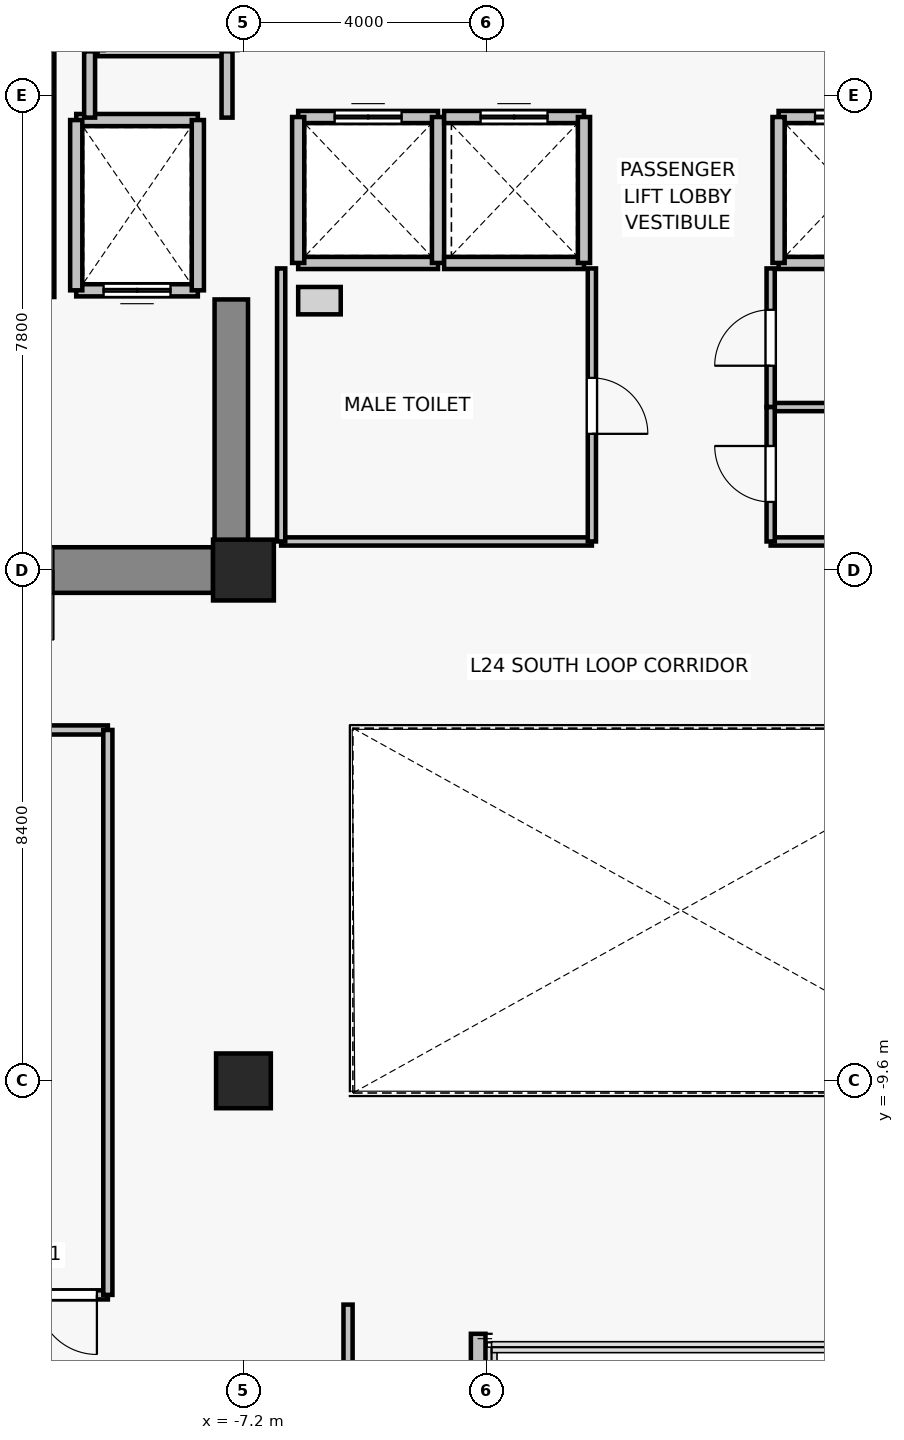
"""IFC4 building model, lengths in metres.
Left out: names, types, materials, properties, quantities, classifications, styles, units other than length and angle.
Written with IfcOpenShell. Run it as: python <this file> out.ifc"""

import sys

from ifc_helpers import new_model, si_unit, direction, frame, frame_2d, origin, origin_2d, place, context, subcontext, project, spatial, rectangle, extrude, source, transform, mapped, element, fill, save


model = new_model("IFC4")
c1 = context("Model", 3, precision=1e-05, world=origin(), true_north=direction((0.0, 1.0)))
c2 = subcontext(c1, "Body", "Model", "MODEL_VIEW")
j1 = project(units=[si_unit("LENGTHUNIT", "METRE"), si_unit("PLANEANGLEUNIT", "RADIAN")], contexts=[c1])
p1 = place(None, origin())
s1 = spatial("IfcSite", under=j1, at=p1, CompositionType="ELEMENT")
p2 = place(p1, origin())
s2 = spatial("IfcBuilding", under=s1, at=p2, CompositionType="ELEMENT")
p3 = place(p2, frame((0.0, 0.0, 90.1)))
s3 = spatial("IfcBuildingStorey", under=s2, at=p3, CompositionType="ELEMENT", Elevation=90.1)
p4 = place(p3, frame((-7.2, -1.2, 0.0), z_axis=(0.0, 0.0, 1.0), x_axis=(1.0, 0.0, 0.0)))
e1 = element("IfcColumn", 1, at=p4, inside=s3, PredefinedType="COLUMN", context=c2, shape_type="SweptSolid", body=[
    extrude(rectangle(XDim=1.0, YDim=1.0, at=origin_2d()), origin(), (0.0, 0.0, 1.0), 3.3),
])
p5 = place(p3, frame((-7.2, -9.6, 0.0), z_axis=(0.0, 0.0, 1.0), x_axis=(1.0, 0.0, 0.0)))
e2 = element("IfcColumn", 2, at=p5, inside=s3, PredefinedType="COLUMN", context=c2, shape_type="SweptSolid", body=[
    extrude(rectangle(XDim=0.9, YDim=0.9, at=origin_2d()), origin(), (0.0, 0.0, 1.0), 3.3),
])
p6 = place(p3, frame((-7.7, -1.2, 0.0), z_axis=(0.0, 0.0, 1.0), x_axis=(-1.0, 0.0, 0.0)))
e3 = element("IfcWall", 3, at=p6, inside=s3, PredefinedType="SHEAR", context=c2, shape_type="SweptSolid", body=[
    extrude(rectangle(XDim=6.2, YDim=0.75, at=frame_2d((3.1, 0.0))), origin(), (0.0, 0.0, 1.0), 3.075),
])
p7 = place(p6, frame((2.625, 0.0, 0.0)))
e4 = element("IfcOpeningElement", 4, at=p7, cuts=e3, PredefinedType="OPENING", context=c2, shape_type="SweptSolid", body=[
    extrude(rectangle(XDim=1.15, YDim=2.15, at=frame_2d((0.575, 1.075))), frame((0.0, 0.385, 0.0), z_axis=(0.0, -1.0, 0.0), x_axis=(1.0, 0.0, 0.0)), (0.0, 0.0, 1.0), 0.77),
])
p8 = place(p3, frame((-7.4, -0.825, 0.0), z_axis=(0.0, 0.0, 1.0), x_axis=(0.0, 1.0, 0.0)))
e5 = element("IfcWall", 5, at=p8, inside=s3, PredefinedType="SHEAR", context=c2, shape_type="SweptSolid", body=[
    extrude(rectangle(XDim=4.075, YDim=0.55, at=frame_2d((2.038, 0.0))), origin(), (0.0, 0.0, 1.0), 3.075),
])
p9 = place(p3, frame((-3.34, -17.56, 0.0), z_axis=(0.0, 0.0, 1.0), x_axis=(0.0, 1.0, 0.0)))
e6 = element("IfcWall", 6, at=p9, inside=s3, PredefinedType="SOLIDWALL", context=c2, shape_type="SweptSolid", body=[
    extrude(rectangle(XDim=3.8, YDim=0.24, at=frame_2d((1.9, 0.0))), origin(), (0.0, 0.0, 1.0), 2.515),
])
p10 = place(p3, frame((-7.95, 3.4, 0.0), z_axis=(0.0, 0.0, 1.0), x_axis=(-1.0, 0.0, 0.0)))
e7 = element("IfcWall", 7, at=p10, inside=s3, PredefinedType="SOLIDWALL", context=c2, shape_type="SweptSolid", body=[
    extrude(rectangle(XDim=2.0, YDim=0.2, at=frame_2d((1.0, 0.0))), origin(), (0.0, 0.0, 1.0), 3.075),
])
p11 = place(p10, frame((0.45, 0.0, 0.0)))
e8 = element("IfcOpeningElement", 8, at=p11, cuts=e7, PredefinedType="OPENING", context=c2, shape_type="SweptSolid", body=[
    extrude(rectangle(XDim=1.1, YDim=2.2, at=frame_2d((0.55, 1.1))), frame((0.0, 0.11, 0.0), z_axis=(0.0, -1.0, 0.0), x_axis=(1.0, 0.0, 0.0)), (0.0, 0.0, 1.0), 0.22),
])
p12 = place(p3, frame((-9.95, 6.2, 0.0), z_axis=(0.0, 0.0, 1.0), x_axis=(1.0, 0.0, 0.0)))
e9 = element("IfcWall", 9, at=p12, inside=s3, PredefinedType="SOLIDWALL", context=c2, shape_type="SweptSolid", body=[
    extrude(rectangle(XDim=2.0, YDim=0.2, at=frame_2d((1.0, 0.0))), origin(), (0.0, 0.0, 1.0), 3.075),
])
for number, where, z_axis, x_axis in (
    (10, (-9.95, 3.4, 0.0), (0.0, 0.0, 1.0), (0.0, 1.0, 0.0)),
    (11, (-7.95, 6.2, 0.0), (0.0, 0.0, 1.0), (0.0, -1.0, 0.0)),
):
    element("IfcWall", number, at=place(p3, frame(where, z_axis=z_axis, x_axis=x_axis)), inside=s3, PredefinedType="SOLIDWALL", context=c2, shape_type="SweptSolid", body=[
        extrude(rectangle(XDim=2.8, YDim=0.2, at=frame_2d((1.4, 0.0))), origin(), (0.0, 0.0, 1.0), 3.075),
    ])
p13 = place(p3, frame((-4.0, 3.85, 0.0), z_axis=(0.0, 0.0, 1.0), x_axis=(-1.0, 0.0, 0.0)))
e12 = element("IfcWall", 12, at=p13, inside=s3, PredefinedType="SOLIDWALL", context=c2, shape_type="SweptSolid", body=[
    extrude(rectangle(XDim=2.3, YDim=0.2, at=frame_2d((1.15, 0.0))), origin(), (0.0, 0.0, 1.0), 3.075),
])
p14 = place(p3, frame((-6.3, 6.25, 0.0), z_axis=(0.0, 0.0, 1.0), x_axis=(1.0, 0.0, 0.0)))
e13 = element("IfcWall", 13, at=p14, inside=s3, PredefinedType="SOLIDWALL", context=c2, shape_type="SweptSolid", body=[
    extrude(rectangle(XDim=2.3, YDim=0.2, at=frame_2d((1.15, 0.0))), origin(), (0.0, 0.0, 1.0), 3.075),
])
p15 = place(p14, frame((0.6, 0.0, 0.0)))
e14 = element("IfcOpeningElement", 14, at=p15, cuts=e13, PredefinedType="OPENING", context=c2, shape_type="SweptSolid", body=[
    extrude(rectangle(XDim=1.1, YDim=2.2, at=frame_2d((0.55, 1.1))), frame((0.0, 0.11, 0.0), z_axis=(0.0, -1.0, 0.0), x_axis=(1.0, 0.0, 0.0)), (0.0, 0.0, 1.0), 0.22),
])
for number, where, z_axis, x_axis in (
    (15, (-6.3, 3.85, 0.0), (0.0, 0.0, 1.0), (0.0, 1.0, 0.0)),
    (16, (-4.0, 6.25, 0.0), (0.0, 0.0, 1.0), (0.0, -1.0, 0.0)),
):
    element("IfcWall", number, at=place(p3, frame(where, z_axis=z_axis, x_axis=x_axis)), inside=s3, PredefinedType="SOLIDWALL", context=c2, shape_type="SweptSolid", body=[
        extrude(rectangle(XDim=2.4, YDim=0.2, at=frame_2d((1.2, 0.0))), origin(), (0.0, 0.0, 1.0), 3.075),
    ])
p16 = place(p3, frame((-1.6, 3.85, 0.0), z_axis=(0.0, 0.0, 1.0), x_axis=(-1.0, 0.0, 0.0)))
e17 = element("IfcWall", 17, at=p16, inside=s3, PredefinedType="SOLIDWALL", context=c2, shape_type="SweptSolid", body=[
    extrude(rectangle(XDim=2.3, YDim=0.2, at=frame_2d((1.15, 0.0))), origin(), (0.0, 0.0, 1.0), 3.075),
])
p17 = place(p3, frame((-3.9, 6.25, 0.0), z_axis=(0.0, 0.0, 1.0), x_axis=(1.0, 0.0, 0.0)))
e18 = element("IfcWall", 18, at=p17, inside=s3, PredefinedType="SOLIDWALL", context=c2, shape_type="SweptSolid", body=[
    extrude(rectangle(XDim=2.3, YDim=0.2, at=frame_2d((1.15, 0.0))), origin(), (0.0, 0.0, 1.0), 3.075),
])
p18 = place(p17, frame((0.6, 0.0, 0.0)))
e19 = element("IfcOpeningElement", 19, at=p18, cuts=e18, PredefinedType="OPENING", context=c2, shape_type="SweptSolid", body=[
    extrude(rectangle(XDim=1.1, YDim=2.2, at=frame_2d((0.55, 1.1))), frame((0.0, 0.11, 0.0), z_axis=(0.0, -1.0, 0.0), x_axis=(1.0, 0.0, 0.0)), (0.0, 0.0, 1.0), 0.22),
])
p19 = place(p3, frame((-1.6, 6.25, 0.0), z_axis=(0.0, 0.0, 1.0), x_axis=(0.0, -1.0, 0.0)))
e20 = element("IfcWall", 20, at=p19, inside=s3, PredefinedType="SOLIDWALL", context=c2, shape_type="SweptSolid", body=[
    extrude(rectangle(XDim=2.4, YDim=0.2, at=frame_2d((1.2, 0.0))), origin(), (0.0, 0.0, 1.0), 3.075),
])
p20 = place(p3, frame((3.9, 3.85, 0.0), z_axis=(0.0, 0.0, 1.0), x_axis=(-1.0, 0.0, 0.0)))
e21 = element("IfcWall", 21, at=p20, inside=s3, PredefinedType="SOLIDWALL", context=c2, shape_type="SweptSolid", body=[
    extrude(rectangle(XDim=2.3, YDim=0.2, at=frame_2d((1.15, 0.0))), origin(), (0.0, 0.0, 1.0), 3.075),
])
p21 = place(p3, frame((1.6, 6.25, 0.0), z_axis=(0.0, 0.0, 1.0), x_axis=(1.0, 0.0, 0.0)))
e22 = element("IfcWall", 22, at=p21, inside=s3, PredefinedType="SOLIDWALL", context=c2, shape_type="SweptSolid", body=[
    extrude(rectangle(XDim=2.3, YDim=0.2, at=frame_2d((1.15, 0.0))), origin(), (0.0, 0.0, 1.0), 3.075),
])
p22 = place(p21, frame((0.6, 0.0, 0.0)))
e23 = element("IfcOpeningElement", 23, at=p22, cuts=e22, PredefinedType="OPENING", context=c2, shape_type="SweptSolid", body=[
    extrude(rectangle(XDim=1.1, YDim=2.2, at=frame_2d((0.55, 1.1))), frame((0.0, 0.11, 0.0), z_axis=(0.0, -1.0, 0.0), x_axis=(1.0, 0.0, 0.0)), (0.0, 0.0, 1.0), 0.22),
])
p23 = place(p3, frame((1.6, 3.85, 0.0), z_axis=(0.0, 0.0, 1.0), x_axis=(0.0, 1.0, 0.0)))
e24 = element("IfcWall", 24, at=p23, inside=s3, PredefinedType="SOLIDWALL", context=c2, shape_type="SweptSolid", body=[
    extrude(rectangle(XDim=2.4, YDim=0.2, at=frame_2d((1.2, 0.0))), origin(), (0.0, 0.0, 1.0), 3.075),
])
p24 = place(p3, frame((-7.4, 7.35, 0.0), z_axis=(0.0, 0.0, 1.0), x_axis=(-1.0, 0.0, 0.0)))
e25 = element("IfcWall", 25, at=p24, inside=s3, PredefinedType="SOLIDWALL", context=c2, shape_type="SweptSolid", body=[
    extrude(rectangle(XDim=2.2, YDim=0.2, at=frame_2d((1.1, 0.0))), origin(), (0.0, 0.0, 1.0), 2.515),
])
p25 = place(p3, frame((-10.41, 12.13, 0.0), z_axis=(0.0, 0.0, 1.0), x_axis=(0.0, -1.0, 0.0)))
e26 = element("IfcWall", 26, at=p25, inside=s3, PredefinedType="SOLIDWALL", context=c2, shape_type="SweptSolid", body=[
    extrude(rectangle(XDim=8.84, YDim=0.2, at=frame_2d((4.42, 0.0))), origin(), (0.0, 0.0, 1.0), 3.075),
])
p26 = place(p3, frame((-9.73, 6.24, 0.0), z_axis=(0.0, 0.0, 1.0), x_axis=(0.0, 1.0, 0.0)))
e27 = element("IfcWall", 27, at=p26, inside=s3, PredefinedType="PARTITIONING", context=c2, shape_type="SweptSolid", body=[
    extrude(rectangle(XDim=1.09, YDim=0.18, at=frame_2d((0.545, 0.0))), origin(), (0.0, 0.0, 1.0), 3.075),
])
p27 = place(p3, frame((-7.47, 7.33, 0.0), z_axis=(0.0, 0.0, 1.0), x_axis=(0.0, -1.0, 0.0)))
e28 = element("IfcWall", 28, at=p27, inside=s3, PredefinedType="PARTITIONING", context=c2, shape_type="SweptSolid", body=[
    extrude(rectangle(XDim=1.09, YDim=0.18, at=frame_2d((0.545, 0.0))), origin(), (0.0, 0.0, 1.0), 2.515),
])
p28 = place(p3, frame((-1.47, -0.73, 0.0), z_axis=(0.0, 0.0, 1.0), x_axis=(-1.0, 0.0, 0.0)))
e29 = element("IfcWall", 29, at=p28, inside=s3, PredefinedType="PARTITIONING", context=c2, shape_type="SweptSolid", body=[
    extrude(rectangle(XDim=5.11, YDim=0.135, at=frame_2d((2.555, 0.0))), origin(), (0.0, 0.0, 1.0), 3.075),
])
p29 = place(p3, frame((-6.58, -0.73, 0.0), z_axis=(0.0, 0.0, 1.0), x_axis=(0.0, 1.0, 0.0)))
e30 = element("IfcWall", 30, at=p29, inside=s3, PredefinedType="PARTITIONING", context=c2, shape_type="SweptSolid", body=[
    extrude(rectangle(XDim=4.49, YDim=0.135, at=frame_2d((2.245, 0.0))), origin(), (0.0, 0.0, 1.0), 3.075),
])
p30 = place(p3, frame((-1.47, 3.76, 0.0), z_axis=(0.0, 0.0, 1.0), x_axis=(0.0, -1.0, 0.0)))
e31 = element("IfcWall", 31, at=p30, inside=s3, PredefinedType="PARTITIONING", context=c2, shape_type="SweptSolid", body=[
    extrude(rectangle(XDim=4.49, YDim=0.135, at=frame_2d((2.245, 0.0))), origin(), (0.0, 0.0, 1.0), 3.075),
])
p31 = place(p30, frame((1.8, 0.0, 0.0)))
e32 = element("IfcOpeningElement", 32, at=p31, cuts=e31, PredefinedType="OPENING", context=c2, shape_type="SweptSolid", body=[
    extrude(rectangle(XDim=0.92, YDim=2.1, at=frame_2d((0.46, 1.05))), frame((0.0, 0.077, 0.0), z_axis=(0.0, -1.0, 0.0), x_axis=(1.0, 0.0, 0.0)), (0.0, 0.0, 1.0), 0.155),
])
p32 = place(p3, frame((6.58, 1.48, 0.0), z_axis=(0.0, 0.0, 1.0), x_axis=(-1.0, 0.0, 0.0)))
e33 = element("IfcWall", 33, at=p32, inside=s3, PredefinedType="PARTITIONING", context=c2, shape_type="SweptSolid", body=[
    extrude(rectangle(XDim=5.11, YDim=0.135, at=frame_2d((2.555, 0.0))), origin(), (0.0, 0.0, 1.0), 3.075),
])
p33 = place(p3, frame((1.47, 1.48, 0.0), z_axis=(0.0, 0.0, 1.0), x_axis=(0.0, 1.0, 0.0)))
e34 = element("IfcWall", 34, at=p33, inside=s3, PredefinedType="PARTITIONING", context=c2, shape_type="SweptSolid", body=[
    extrude(rectangle(XDim=2.28, YDim=0.135, at=frame_2d((1.14, 0.0))), origin(), (0.0, 0.0, 1.0), 3.075),
])
p34 = place(p33, frame((0.68, 0.0, 0.0)))
e35 = element("IfcOpeningElement", 35, at=p34, cuts=e34, PredefinedType="OPENING", context=c2, shape_type="SweptSolid", body=[
    extrude(rectangle(XDim=0.92, YDim=2.1, at=frame_2d((0.46, 1.05))), frame((0.0, 0.077, 0.0), z_axis=(0.0, -1.0, 0.0), x_axis=(1.0, 0.0, 0.0)), (0.0, 0.0, 1.0), 0.155),
])
p35 = place(p3, frame((4.18, -0.73, 0.0), z_axis=(0.0, 0.0, 1.0), x_axis=(-1.0, 0.0, 0.0)))
e36 = element("IfcWall", 36, at=p35, inside=s3, PredefinedType="PARTITIONING", context=c2, shape_type="SweptSolid", body=[
    extrude(rectangle(XDim=2.71, YDim=0.135, at=frame_2d((1.355, 0.0))), origin(), (0.0, 0.0, 1.0), 3.075),
])
p36 = place(p3, frame((1.47, -0.73, 0.0), z_axis=(0.0, 0.0, 1.0), x_axis=(0.0, 1.0, 0.0)))
e37 = element("IfcWall", 37, at=p36, inside=s3, PredefinedType="PARTITIONING", context=c2, shape_type="SweptSolid", body=[
    extrude(rectangle(XDim=2.21, YDim=0.135, at=frame_2d((1.105, 0.0))), origin(), (0.0, 0.0, 1.0), 3.075),
])
p37 = place(p36, frame((0.65, 0.0, 0.0)))
e38 = element("IfcOpeningElement", 38, at=p37, cuts=e37, PredefinedType="OPENING", context=c2, shape_type="SweptSolid", body=[
    extrude(rectangle(XDim=0.92, YDim=2.1, at=frame_2d((0.46, 1.05))), frame((0.0, 0.077, 0.0), z_axis=(0.0, -1.0, 0.0), x_axis=(1.0, 0.0, 0.0)), (0.0, 0.0, 1.0), 0.155),
])
p38 = place(p3, frame((-9.43, -13.12, 0.0), z_axis=(0.0, 0.0, 1.0), x_axis=(-1.0, 0.0, 0.0)))
e39 = element("IfcWall", 39, at=p38, inside=s3, PredefinedType="PARTITIONING", context=c2, shape_type="SweptSolid", body=[
    extrude(rectangle(XDim=20.1, YDim=0.15, at=frame_2d((10.05, 0.0))), origin(), (0.0, 0.0, 1.0), 2.515),
])
p39 = place(p38, frame((0.18, 0.0, 0.0)))
e40 = element("IfcOpeningElement", 40, at=p39, cuts=e39, PredefinedType="OPENING", context=c2, shape_type="SweptSolid", body=[
    extrude(rectangle(XDim=0.98, YDim=2.15, at=frame_2d((0.49, 1.075))), frame((0.0, 0.085, 0.0), z_axis=(0.0, -1.0, 0.0), x_axis=(1.0, 0.0, 0.0)), (0.0, 0.0, 1.0), 0.17),
])
p40 = place(p3, frame((-29.53, -3.83, 0.0), z_axis=(0.0, 0.0, 1.0), x_axis=(1.0, 0.0, 0.0)))
e41 = element("IfcWall", 41, at=p40, inside=s3, PredefinedType="PARTITIONING", context=c2, shape_type="SweptSolid", body=[
    extrude(rectangle(XDim=20.1, YDim=0.15, at=frame_2d((10.05, 0.0))), origin(), (0.0, 0.0, 1.0), 2.515),
])
p41 = place(p40, frame((15.61, 0.0, 0.0)))
e42 = element("IfcOpeningElement", 42, at=p41, cuts=e41, PredefinedType="OPENING", context=c2, shape_type="SweptSolid", body=[
    extrude(rectangle(XDim=0.98, YDim=2.15, at=frame_2d((0.49, 1.075))), frame((0.0, 0.085, 0.0), z_axis=(0.0, -1.0, 0.0), x_axis=(1.0, 0.0, 0.0)), (0.0, 0.0, 1.0), 0.17),
])
p42 = place(p3, frame((-9.43, -3.83, 0.0), z_axis=(0.0, 0.0, 1.0), x_axis=(0.0, -1.0, 0.0)))
e43 = element("IfcWall", 43, at=p42, inside=s3, PredefinedType="PARTITIONING", context=c2, shape_type="SweptSolid", body=[
    extrude(rectangle(XDim=9.29, YDim=0.15, at=frame_2d((4.645, 0.0))), origin(), (0.0, 0.0, 1.0), 2.515),
])
p43 = place(p3, frame((-5.48, -13.28, 0.0), z_axis=(0.0, 0.0, 1.0), x_axis=(0.0, -1.0, 0.0)))
e44 = element("IfcWall", 44, at=p43, inside=s3, PredefinedType="PARTITIONING", context=c2, shape_type="SweptSolid", body=[
    extrude(rectangle(XDim=4.35, YDim=0.15, at=frame_2d((2.175, 0.0))), origin(), (0.0, 0.0, 1.0), 2.565),
])
m1 = source(origin(), c2, "Body", "SweptSolid", [
    extrude(rectangle(XDim=1.1, YDim=2.2, at=frame_2d((0.55, 1.1))), frame((0.0, 0.025, 0.0), z_axis=(0.0, -1.0, 0.0), x_axis=(1.0, 0.0, 0.0)), (0.0, 0.0, 1.0), 0.05),
])
p44 = place(p11, origin())
e45 = element("IfcDoor", 45, at=p44, inside=s3, OperationType="DOUBLE_DOOR_SLIDING", PredefinedType="DOOR", context=c2, shape_type="MappedRepresentation", body=[
    mapped(m1, transform((0.0, 0.0, 0.0), x_axis=(1.0, 0.0, 0.0), y_axis=(0.0, 1.0, 0.0), z_axis=(0.0, 0.0, 1.0), scale=1.0)),
])
fill(e8, e45)
p45 = place(p15, origin())
e46 = element("IfcDoor", 46, at=p45, inside=s3, OperationType="DOUBLE_DOOR_SLIDING", PredefinedType="DOOR", context=c2, shape_type="MappedRepresentation", body=[
    mapped(m1, transform((0.0, 0.0, 0.0), x_axis=(1.0, 0.0, 0.0), y_axis=(0.0, 1.0, 0.0), z_axis=(0.0, 0.0, 1.0), scale=1.0)),
])
fill(e14, e46)
p46 = place(p18, origin())
e47 = element("IfcDoor", 47, at=p46, inside=s3, OperationType="DOUBLE_DOOR_SLIDING", PredefinedType="DOOR", context=c2, shape_type="MappedRepresentation", body=[
    mapped(m1, transform((0.0, 0.0, 0.0), x_axis=(1.0, 0.0, 0.0), y_axis=(0.0, 1.0, 0.0), z_axis=(0.0, 0.0, 1.0), scale=1.0)),
])
fill(e19, e47)
p47 = place(p22, origin())
e48 = element("IfcDoor", 48, at=p47, inside=s3, OperationType="DOUBLE_DOOR_SLIDING", PredefinedType="DOOR", context=c2, shape_type="MappedRepresentation", body=[
    mapped(m1, transform((0.0, 0.0, 0.0), x_axis=(1.0, 0.0, 0.0), y_axis=(0.0, 1.0, 0.0), z_axis=(0.0, 0.0, 1.0), scale=1.0)),
])
fill(e23, e48)
m2 = source(origin(), c2, "Body", "SweptSolid", [
    extrude(rectangle(XDim=1.15, YDim=2.15, at=frame_2d((0.575, 1.075))), frame((0.0, 0.025, 0.0), z_axis=(0.0, -1.0, 0.0), x_axis=(1.0, 0.0, 0.0)), (0.0, 0.0, 1.0), 0.05),
])
p48 = place(p7, origin())
e49 = element("IfcDoor", 49, at=p48, inside=s3, OperationType="SINGLE_SWING_LEFT", PredefinedType="DOOR", context=c2, shape_type="MappedRepresentation", body=[
    mapped(m2, transform((0.0, 0.0, 0.0), x_axis=(1.0, 0.0, 0.0), y_axis=(0.0, 1.0, 0.0), z_axis=(0.0, 0.0, 1.0), scale=1.0)),
])
fill(e4, e49)
m3 = source(origin(), c2, "Body", "SweptSolid", [
    extrude(rectangle(XDim=0.92, YDim=2.1, at=frame_2d((0.46, 1.05))), frame((0.0, 0.025, 0.0), z_axis=(0.0, -1.0, 0.0), x_axis=(1.0, 0.0, 0.0)), (0.0, 0.0, 1.0), 0.05),
])
p49 = place(p31, origin())
e50 = element("IfcDoor", 50, at=p49, inside=s3, OperationType="SINGLE_SWING_RIGHT", PredefinedType="DOOR", context=c2, shape_type="MappedRepresentation", body=[
    mapped(m3, transform((0.0, 0.0, 0.0), x_axis=(1.0, 0.0, 0.0), y_axis=(0.0, 1.0, 0.0), z_axis=(0.0, 0.0, 1.0), scale=1.0)),
])
fill(e32, e50)
p50 = place(p34, origin())
e51 = element("IfcDoor", 51, at=p50, inside=s3, OperationType="SINGLE_SWING_LEFT", PredefinedType="DOOR", context=c2, shape_type="MappedRepresentation", body=[
    mapped(m3, transform((0.0, 0.0, 0.0), x_axis=(1.0, 0.0, 0.0), y_axis=(0.0, 1.0, 0.0), z_axis=(0.0, 0.0, 1.0), scale=1.0)),
])
fill(e35, e51)
p51 = place(p37, origin())
e52 = element("IfcDoor", 52, at=p51, inside=s3, OperationType="SINGLE_SWING_RIGHT", PredefinedType="DOOR", context=c2, shape_type="MappedRepresentation", body=[
    mapped(m3, transform((0.0, 0.0, 0.0), x_axis=(1.0, 0.0, 0.0), y_axis=(0.0, 1.0, 0.0), z_axis=(0.0, 0.0, 1.0), scale=1.0)),
])
fill(e38, e52)
m4 = source(origin(), c2, "Body", "SweptSolid", [
    extrude(rectangle(XDim=0.98, YDim=2.15, at=frame_2d((0.49, 1.075))), frame((0.0, 0.025, 0.0), z_axis=(0.0, -1.0, 0.0), x_axis=(1.0, 0.0, 0.0)), (0.0, 0.0, 1.0), 0.05),
])
p52 = place(p39, origin())
e53 = element("IfcDoor", 53, at=p52, inside=s3, OperationType="SINGLE_SWING_LEFT", PredefinedType="DOOR", context=c2, shape_type="MappedRepresentation", body=[
    mapped(m4, transform((0.0, 0.0, 0.0), x_axis=(1.0, 0.0, 0.0), y_axis=(0.0, 1.0, 0.0), z_axis=(0.0, 0.0, 1.0), scale=1.0)),
])
fill(e40, e53)
save(model, sys.argv[1])
